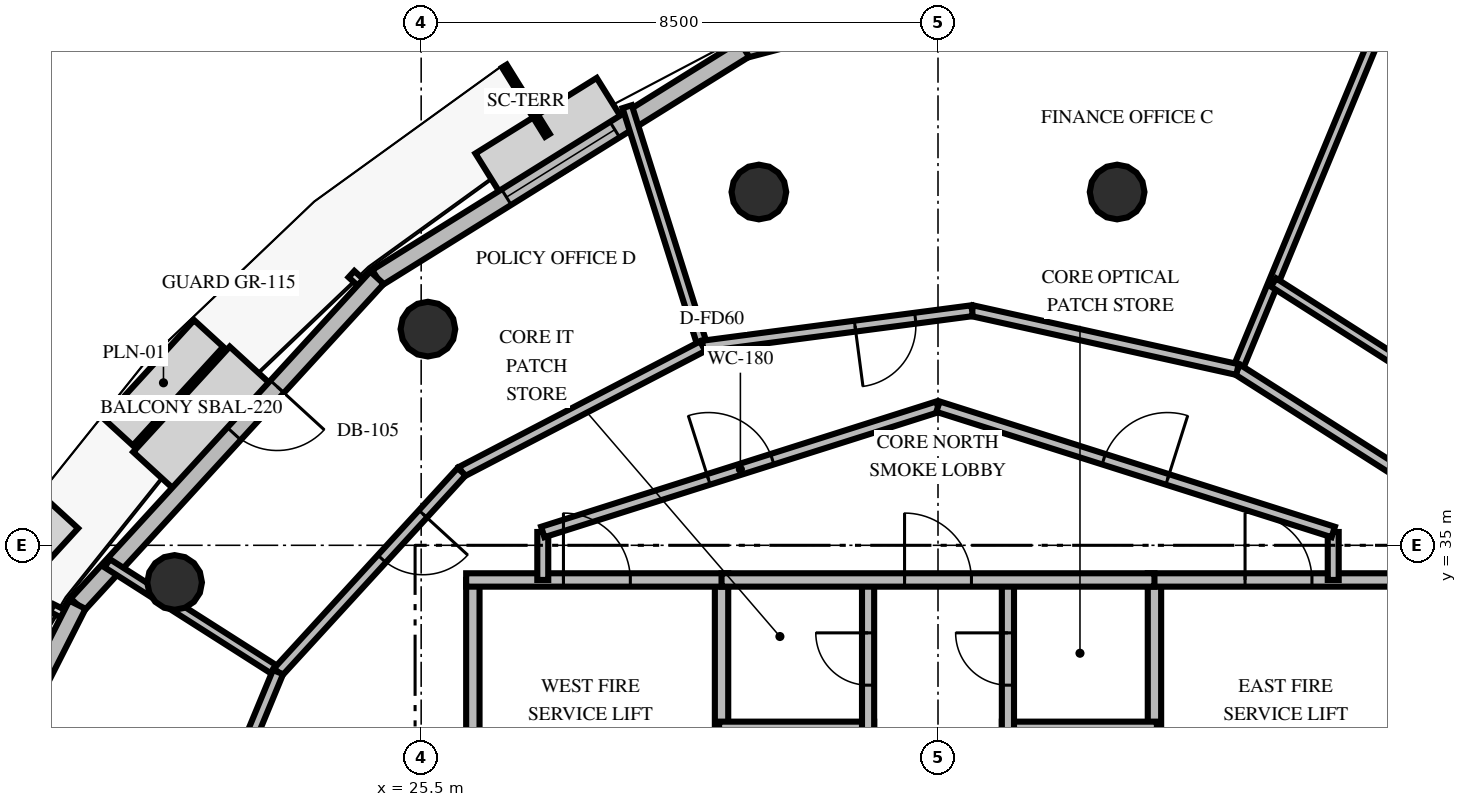
"""IFC4 building model, lengths in metres.
Left out: names, types, materials, properties, quantities, classifications, styles, units other than length and angle.
Written with IfcOpenShell. Run it as: python <this file> out.ifc"""

import sys

from ifc_helpers import new_model, si_unit, direction, frame, frame_2d, origin, origin_2d, place, context, subcontext, project, spatial, rectangle, circle, extrude, element, fill, save


model = new_model("IFC4")
c1 = context("Model", 3, precision=1e-05, world=origin(), true_north=direction((0.0, 1.0)))
c2 = subcontext(c1, "Body", "Model", "MODEL_VIEW")
j1 = project(units=[si_unit("LENGTHUNIT", "METRE"), si_unit("PLANEANGLEUNIT", "RADIAN")], contexts=[c1])
p1 = place(None, origin())
s1 = spatial("IfcSite", under=j1, at=p1, CompositionType="ELEMENT")
p2 = place(p1, origin())
s2 = spatial("IfcBuilding", under=s1, at=p2, CompositionType="ELEMENT")
p3 = place(p2, frame((0.0, 0.0, 230.4)))
s3 = spatial("IfcBuildingStorey", under=s2, at=p3, CompositionType="ELEMENT", Elevation=230.4)
for number, where, z_axis, x_axis in (
    (1, (36.946, 40.81, -0.22), (0.0, 0.0, 1.0), (1.0, 0.0, 0.0)),
    (2, (31.054, 40.81, -0.22), (0.0, 0.0, 1.0), (1.0, 0.0, 0.0)),
    (3, (25.611, 38.555, -0.22), (0.0, 0.0, 1.0), (1.0, 0.0, 0.0)),
    (4, (21.445, 34.389, -0.22), (0.0, 0.0, 1.0), (1.0, 0.0, 0.0)),
):
    element("IfcColumn", number, at=place(p3, frame(where, z_axis=z_axis, x_axis=x_axis)), inside=s3, PredefinedType="COLUMN", context=c2, shape_type="SweptSolid", body=[
        extrude(circle(Radius=0.45, at=origin_2d()), origin(), (0.0, 0.0, 1.0), 3.82),
    ])
p4 = place(p3, frame((37.238, 44.852, 0.0), z_axis=(0.0, 0.0, 1.0), x_axis=(-0.967065492063, -0.254527668555, 0.0)))
e5 = element("IfcWall", 5, at=p4, inside=s3, PredefinedType="SOLIDWALL", context=c2, shape_type="SweptSolid", body=[
    extrude(rectangle(XDim=6.643, YDim=0.3, at=frame_2d((3.322, 0.0))), origin(), (0.0, 0.0, 1.0), 2.76),
])
p5 = place(p4, frame((2.272, 0.0, 0.8)))
e6 = element("IfcOpeningElement", 6, at=p5, cuts=e5, PredefinedType="OPENING", context=c2, shape_type="SweptSolid", body=[
    extrude(rectangle(XDim=2.1, YDim=1.85, at=frame_2d((1.05, 0.925))), frame((0.0, 0.16, 0.0), z_axis=(0.0, -1.0, 0.0), x_axis=(1.0, 0.0, 0.0)), (0.0, 0.0, 1.0), 0.32),
])
p6 = place(p3, frame((30.814, 43.161, 0.0), z_axis=(0.0, 0.0, 1.0), x_axis=(-0.848899232852, -0.528554720406, 0.0)))
e7 = element("IfcWall", 7, at=p6, inside=s3, PredefinedType="SOLIDWALL", context=c2, shape_type="SweptSolid", body=[
    extrude(rectangle(XDim=7.115, YDim=0.3, at=frame_2d((3.558, 0.0))), origin(), (0.0, 0.0, 1.0), 2.76),
])
p7 = place(p6, frame((2.508, 0.0, 0.8)))
e8 = element("IfcOpeningElement", 8, at=p7, cuts=e7, PredefinedType="OPENING", context=c2, shape_type="SweptSolid", body=[
    extrude(rectangle(XDim=2.1, YDim=1.85, at=frame_2d((1.05, 0.925))), frame((0.0, 0.16, 0.0), z_axis=(0.0, -1.0, 0.0), x_axis=(1.0, 0.0, 0.0)), (0.0, 0.0, 1.0), 0.32),
])
p8 = place(p3, frame((24.774, 39.4, 0.0), z_axis=(0.0, 0.0, 1.0), x_axis=(-0.675568478711, -0.737297247094, 0.0)))
e9 = element("IfcWall", 9, at=p8, inside=s3, PredefinedType="SOLIDWALL", context=c2, shape_type="SweptSolid", body=[
    extrude(rectangle(XDim=7.293, YDim=0.3, at=frame_2d((3.646, 0.0))), origin(), (0.0, 0.0, 1.0), 2.76),
])
p9 = place(p8, frame((2.43, 0.0, 0.0)))
e10 = element("IfcOpeningElement", 10, at=p9, cuts=e9, PredefinedType="OPENING", context=c2, shape_type="SweptSolid", body=[
    extrude(rectangle(XDim=1.05, YDim=2.15, at=frame_2d((0.525, 1.075))), frame((0.0, 0.16, 0.0), z_axis=(0.0, -1.0, 0.0), x_axis=(1.0, 0.0, 0.0)), (0.0, 0.0, 1.0), 0.32),
])
p10 = place(p3, frame((19.847, 34.023, 0.0), z_axis=(0.0, 0.0, 1.0), x_axis=(-0.452571902959, -0.891727914025, 0.0)))
e11 = element("IfcWall", 11, at=p10, inside=s3, PredefinedType="SOLIDWALL", context=c2, shape_type="SweptSolid", body=[
    extrude(rectangle(XDim=7.115, YDim=0.3, at=frame_2d((3.558, 0.0))), origin(), (0.0, 0.0, 1.0), 2.76),
])
p11 = place(p10, frame((2.508, 0.0, 0.8)))
e12 = element("IfcOpeningElement", 12, at=p11, cuts=e11, PredefinedType="OPENING", context=c2, shape_type="SweptSolid", body=[
    extrude(rectangle(XDim=2.1, YDim=1.85, at=frame_2d((1.05, 0.925))), frame((0.0, 0.16, 0.0), z_axis=(0.0, -1.0, 0.0), x_axis=(1.0, 0.0, 0.0)), (0.0, 0.0, 1.0), 0.32),
])
p12 = place(p3, frame((26.35, 30.05, 0.0), z_axis=(0.0, 0.0, 1.0), x_axis=(0.0, 1.0, 0.0)))
e13 = element("IfcWall", 13, at=p12, inside=s3, PredefinedType="SOLIDWALL", context=c2, shape_type="SweptSolid", body=[
    extrude(rectangle(XDim=4.38, YDim=0.22, at=frame_2d((2.19, 0.0))), origin(), (0.0, 0.0, 1.0), 2.46),
])
p13 = place(p3, frame((30.44, 30.05, 0.0), z_axis=(0.0, 0.0, 1.0), x_axis=(0.0, 1.0, 0.0)))
e14 = element("IfcWall", 14, at=p13, inside=s3, PredefinedType="SOLIDWALL", context=c2, shape_type="SweptSolid", body=[
    extrude(rectangle(XDim=4.38, YDim=0.22, at=frame_2d((2.19, 0.0))), origin(), (0.0, 0.0, 1.0), 2.46),
])
p14 = place(p13, frame((0.8, 0.0, 0.0)))
e15 = element("IfcOpeningElement", 15, at=p14, cuts=e14, PredefinedType="OPENING", context=c2, shape_type="SweptSolid", body=[
    extrude(rectangle(XDim=1.05, YDim=2.1, at=frame_2d((0.525, 1.05))), frame((0.0, 0.12, 0.0), z_axis=(0.0, -1.0, 0.0), x_axis=(1.0, 0.0, 0.0)), (0.0, 0.0, 1.0), 0.24),
])
p15 = place(p3, frame((26.24, 34.43, 0.0), z_axis=(0.0, 0.0, 1.0), x_axis=(1.0, 0.0, 0.0)))
e16 = element("IfcWall", 16, at=p15, inside=s3, PredefinedType="SOLIDWALL", context=c2, shape_type="SweptSolid", body=[
    extrude(rectangle(XDim=4.31, YDim=0.22, at=frame_2d((2.155, 0.0))), origin(), (0.0, 0.0, 1.0), 2.46),
])
p16 = place(p15, frame((1.6, 0.0, 0.0)))
e17 = element("IfcOpeningElement", 17, at=p16, cuts=e16, PredefinedType="OPENING", context=c2, shape_type="SweptSolid", body=[
    extrude(rectangle(XDim=1.1, YDim=2.15, at=frame_2d((0.55, 1.075))), frame((0.0, 0.12, 0.0), z_axis=(0.0, -1.0, 0.0), x_axis=(1.0, 0.0, 0.0)), (0.0, 0.0, 1.0), 0.24),
])
p17 = place(p3, frame((30.4, 32.0, 0.0), z_axis=(0.0, 0.0, 1.0), x_axis=(1.0, 0.0, 0.0)))
e18 = element("IfcWall", 18, at=p17, inside=s3, PredefinedType="SOLIDWALL", context=c2, shape_type="SweptSolid", body=[
    extrude(rectangle(XDim=2.55, YDim=0.2, at=frame_2d((1.275, 0.0))), origin(), (0.0, 0.0, 1.0), 2.46),
])
p18 = place(p3, frame((32.85, 30.05, 0.0), z_axis=(0.0, 0.0, 1.0), x_axis=(0.0, 1.0, 0.0)))
e19 = element("IfcWall", 19, at=p18, inside=s3, PredefinedType="SOLIDWALL", context=c2, shape_type="SweptSolid", body=[
    extrude(rectangle(XDim=4.38, YDim=0.2, at=frame_2d((2.19, 0.0))), origin(), (0.0, 0.0, 1.0), 2.46),
])
p19 = place(p18, frame((2.65, 0.0, 0.0)))
e20 = element("IfcOpeningElement", 20, at=p19, cuts=e19, PredefinedType="OPENING", context=c2, shape_type="SweptSolid", body=[
    extrude(rectangle(XDim=0.86, YDim=2.05, at=frame_2d((0.43, 1.025))), frame((0.0, 0.11, 0.0), z_axis=(0.0, -1.0, 0.0), x_axis=(1.0, 0.0, 0.0)), (0.0, 0.0, 1.0), 0.22),
])
p20 = place(p3, frame((37.56, 30.05, 0.0), z_axis=(0.0, 0.0, 1.0), x_axis=(0.0, 1.0, 0.0)))
e21 = element("IfcWall", 21, at=p20, inside=s3, PredefinedType="SOLIDWALL", context=c2, shape_type="SweptSolid", body=[
    extrude(rectangle(XDim=4.38, YDim=0.22, at=frame_2d((2.19, 0.0))), origin(), (0.0, 0.0, 1.0), 2.46),
])
p21 = place(p20, frame((0.8, 0.0, 0.0)))
e22 = element("IfcOpeningElement", 22, at=p21, cuts=e21, PredefinedType="OPENING", context=c2, shape_type="SweptSolid", body=[
    extrude(rectangle(XDim=1.05, YDim=2.1, at=frame_2d((0.525, 1.05))), frame((0.0, 0.12, 0.0), z_axis=(0.0, -1.0, 0.0), x_axis=(1.0, 0.0, 0.0)), (0.0, 0.0, 1.0), 0.24),
])
p22 = place(p3, frame((37.45, 34.43, 0.0), z_axis=(0.0, 0.0, 1.0), x_axis=(1.0, 0.0, 0.0)))
e23 = element("IfcWall", 23, at=p22, inside=s3, PredefinedType="SOLIDWALL", context=c2, shape_type="SweptSolid", body=[
    extrude(rectangle(XDim=4.31, YDim=0.22, at=frame_2d((2.155, 0.0))), origin(), (0.0, 0.0, 1.0), 2.46),
])
p23 = place(p22, frame((1.6, 0.0, 0.0)))
e24 = element("IfcOpeningElement", 24, at=p23, cuts=e23, PredefinedType="OPENING", context=c2, shape_type="SweptSolid", body=[
    extrude(rectangle(XDim=1.1, YDim=2.15, at=frame_2d((0.55, 1.075))), frame((0.0, 0.12, 0.0), z_axis=(0.0, -1.0, 0.0), x_axis=(1.0, 0.0, 0.0)), (0.0, 0.0, 1.0), 0.24),
])
p24 = place(p3, frame((35.05, 32.0, 0.0), z_axis=(0.0, 0.0, 1.0), x_axis=(1.0, 0.0, 0.0)))
e25 = element("IfcWall", 25, at=p24, inside=s3, PredefinedType="SOLIDWALL", context=c2, shape_type="SweptSolid", body=[
    extrude(rectangle(XDim=2.55, YDim=0.2, at=frame_2d((1.275, 0.0))), origin(), (0.0, 0.0, 1.0), 2.46),
])
p25 = place(p3, frame((35.15, 30.05, 0.0), z_axis=(0.0, 0.0, 1.0), x_axis=(0.0, 1.0, 0.0)))
e26 = element("IfcWall", 26, at=p25, inside=s3, PredefinedType="SOLIDWALL", context=c2, shape_type="SweptSolid", body=[
    extrude(rectangle(XDim=4.38, YDim=0.2, at=frame_2d((2.19, 0.0))), origin(), (0.0, 0.0, 1.0), 2.46),
])
p26 = place(p25, frame((2.65, 0.0, 0.0)))
e27 = element("IfcOpeningElement", 27, at=p26, cuts=e26, PredefinedType="OPENING", context=c2, shape_type="SweptSolid", body=[
    extrude(rectangle(XDim=0.86, YDim=2.05, at=frame_2d((0.43, 1.025))), frame((0.0, 0.11, 0.0), z_axis=(0.0, -1.0, 0.0), x_axis=(1.0, 0.0, 0.0)), (0.0, 0.0, 1.0), 0.22),
])
p27 = place(p3, frame((30.44, 34.43, 0.0), z_axis=(0.0, 0.0, 1.0), x_axis=(1.0, 0.0, 0.0)))
e28 = element("IfcWall", 28, at=p27, inside=s3, PredefinedType="SOLIDWALL", context=c2, shape_type="SweptSolid", body=[
    extrude(rectangle(XDim=7.12, YDim=0.22, at=frame_2d((3.56, 0.0))), origin(), (0.0, 0.0, 1.0), 2.46),
])
p28 = place(p27, frame((3.01, 0.0, 0.0)))
e29 = element("IfcOpeningElement", 29, at=p28, cuts=e28, PredefinedType="OPENING", context=c2, shape_type="SweptSolid", body=[
    extrude(rectangle(XDim=1.1, YDim=2.15, at=frame_2d((0.55, 1.075))), frame((0.0, 0.12, 0.0), z_axis=(0.0, -1.0, 0.0), x_axis=(1.0, 0.0, 0.0)), (0.0, 0.0, 1.0), 0.24),
])
for number, where, z_axis, x_axis in (
    (30, (27.5, 34.43, 0.0), (0.0, 0.0, 1.0), (0.0, 1.0, 0.0)),
    (31, (40.5, 35.219, 0.0), (0.0, 0.0, 1.0), (0.0, -1.0, 0.0)),
):
    element("IfcWall", number, at=place(p3, frame(where, z_axis=z_axis, x_axis=x_axis)), inside=s3, PredefinedType="PARTITIONING", context=c2, shape_type="SweptSolid", body=[
        extrude(rectangle(XDim=0.789, YDim=0.18, at=frame_2d((0.395, 0.0))), origin(), (0.0, 0.0, 1.0), 2.46),
    ])
p29 = place(p3, frame((27.5, 35.219, 0.0), z_axis=(0.0, 0.0, 1.0), x_axis=(0.953228121756, 0.302251795518, 0.0)))
e32 = element("IfcWall", 32, at=p29, inside=s3, PredefinedType="PARTITIONING", context=c2, shape_type="SweptSolid", body=[
    extrude(rectangle(XDim=6.819, YDim=0.18, at=frame_2d((3.409, 0.0))), origin(), (0.0, 0.0, 1.0), 2.46),
])
p30 = place(p29, frame((2.86, 0.0, 0.0)))
e33 = element("IfcOpeningElement", 33, at=p30, cuts=e32, PredefinedType="OPENING", context=c2, shape_type="SweptSolid", body=[
    extrude(rectangle(XDim=1.1, YDim=2.15, at=frame_2d((0.55, 1.075))), frame((0.0, 0.1, 0.0), z_axis=(0.0, -1.0, 0.0), x_axis=(1.0, 0.0, 0.0)), (0.0, 0.0, 1.0), 0.2),
])
p31 = place(p3, frame((34.0, 37.28, 0.0), z_axis=(0.0, 0.0, 1.0), x_axis=(0.953228121756, -0.302251795518, 0.0)))
e34 = element("IfcWall", 34, at=p31, inside=s3, PredefinedType="PARTITIONING", context=c2, shape_type="SweptSolid", body=[
    extrude(rectangle(XDim=6.819, YDim=0.18, at=frame_2d((3.409, 0.0))), origin(), (0.0, 0.0, 1.0), 2.46),
])
p32 = place(p31, frame((2.86, 0.0, 0.0)))
e35 = element("IfcOpeningElement", 35, at=p32, cuts=e34, PredefinedType="OPENING", context=c2, shape_type="SweptSolid", body=[
    extrude(rectangle(XDim=1.1, YDim=2.15, at=frame_2d((0.55, 1.075))), frame((0.0, 0.1, 0.0), z_axis=(0.0, -1.0, 0.0), x_axis=(1.0, 0.0, 0.0)), (0.0, 0.0, 1.0), 0.2),
])
p33 = place(p3, frame((38.925, 37.89, 0.0), z_axis=(0.0, 0.0, 1.0), x_axis=(0.382676871851, 0.923882249938, 0.0)))
e36 = element("IfcWall", 36, at=p33, inside=s3, PredefinedType="PARTITIONING", context=c2, shape_type="SweptSolid", body=[
    extrude(rectangle(XDim=7.318, YDim=0.16, at=frame_2d((3.659, 0.0))), origin(), (0.0, 0.0, 1.0), 2.46),
])
p34 = place(p3, frame((42.695, 35.489, 0.0), z_axis=(0.0, 0.0, 1.0), x_axis=(-0.843391492769, 0.53729953464, 0.0)))
e37 = element("IfcWall", 37, at=p34, inside=s3, PredefinedType="PARTITIONING", context=c2, shape_type="SweptSolid", body=[
    extrude(rectangle(XDim=4.47, YDim=0.18, at=frame_2d((2.235, 0.0))), origin(), (0.0, 0.0, 1.0), 2.46),
])
p35 = place(p3, frame((43.742, 36.632, 0.0), z_axis=(0.0, 0.0, 1.0), x_axis=(-0.84339841599, 0.537288667204, 0.0)))
e38 = element("IfcWall", 38, at=p35, inside=s3, PredefinedType="PARTITIONING", context=c2, shape_type="SweptSolid", body=[
    extrude(rectangle(XDim=5.008, YDim=0.16, at=frame_2d((2.504, 0.0))), origin(), (0.0, 0.0, 1.0), 2.46),
])
p36 = place(p3, frame((30.13, 38.274, 0.0), z_axis=(0.0, 0.0, 1.0), x_axis=(-0.300684286432, 0.953723733527, 0.0)))
e39 = element("IfcWall", 39, at=p36, inside=s3, PredefinedType="PARTITIONING", context=c2, shape_type="SweptSolid", body=[
    extrude(rectangle(XDim=4.13, YDim=0.16, at=frame_2d((2.065, 0.0))), origin(), (0.0, 0.0, 1.0), 2.46),
])
p37 = place(p3, frame((38.925, 37.89, 0.0), z_axis=(0.0, 0.0, 1.0), x_axis=(-0.976291048481, 0.216461979699, 0.0)))
e40 = element("IfcWall", 40, at=p37, inside=s3, PredefinedType="PARTITIONING", context=c2, shape_type="SweptSolid", body=[
    extrude(rectangle(XDim=4.47, YDim=0.18, at=frame_2d((2.235, 0.0))), origin(), (0.0, 0.0, 1.0), 2.46),
])
p38 = place(p3, frame((34.561, 38.858, 0.0), z_axis=(0.0, 0.0, 1.0), x_axis=(-0.991442206796, -0.130546354154, 0.0)))
e41 = element("IfcWall", 41, at=p38, inside=s3, PredefinedType="PARTITIONING", context=c2, shape_type="SweptSolid", body=[
    extrude(rectangle(XDim=4.47, YDim=0.18, at=frame_2d((2.235, 0.0))), origin(), (0.0, 0.0, 1.0), 2.46),
])
p39 = place(p38, frame((0.942, 0.0, 0.0)))
e42 = element("IfcOpeningElement", 42, at=p39, cuts=e41, PredefinedType="OPENING", context=c2, shape_type="SweptSolid", body=[
    extrude(rectangle(XDim=1.0, YDim=2.15, at=frame_2d((0.5, 1.075))), frame((0.0, 0.1, 0.0), z_axis=(0.0, -1.0, 0.0), x_axis=(1.0, 0.0, 0.0)), (0.0, 0.0, 1.0), 0.2),
])
p40 = place(p3, frame((23.146, 32.915, 0.0), z_axis=(0.0, 0.0, 1.0), x_axis=(-0.843383723395, 0.537311729922, 0.0)))
e43 = element("IfcWall", 43, at=p40, inside=s3, PredefinedType="PARTITIONING", context=c2, shape_type="SweptSolid", body=[
    extrude(rectangle(XDim=3.331, YDim=0.16, at=frame_2d((1.666, 0.0))), origin(), (0.0, 0.0, 1.0), 2.46),
])
p41 = place(p3, frame((30.13, 38.274, 0.0), z_axis=(0.0, 0.0, 1.0), x_axis=(-0.886999386077, -0.461770602247, 0.0)))
e44 = element("IfcWall", 44, at=p41, inside=s3, PredefinedType="PARTITIONING", context=c2, shape_type="SweptSolid", body=[
    extrude(rectangle(XDim=4.47, YDim=0.18, at=frame_2d((2.235, 0.0))), origin(), (0.0, 0.0, 1.0), 2.46),
])
p42 = place(p3, frame((26.165, 36.21, 0.0), z_axis=(0.0, 0.0, 1.0), x_axis=(-0.675600949954, -0.737267493126, 0.0)))
e45 = element("IfcWall", 45, at=p42, inside=s3, PredefinedType="PARTITIONING", context=c2, shape_type="SweptSolid", body=[
    extrude(rectangle(XDim=4.47, YDim=0.18, at=frame_2d((2.235, 0.0))), origin(), (0.0, 0.0, 1.0), 2.46),
])
p43 = place(p42, frame((0.942, 0.0, 0.0)))
e46 = element("IfcOpeningElement", 46, at=p43, cuts=e45, PredefinedType="OPENING", context=c2, shape_type="SweptSolid", body=[
    extrude(rectangle(XDim=1.0, YDim=2.15, at=frame_2d((0.5, 1.075))), frame((0.0, 0.1, 0.0), z_axis=(0.0, -1.0, 0.0), x_axis=(1.0, 0.0, 0.0)), (0.0, 0.0, 1.0), 0.2),
])
p44 = place(p3, frame((23.146, 32.915, 0.0), z_axis=(0.0, 0.0, 1.0), x_axis=(-0.382683050338, -0.923879690752, 0.0)))
e47 = element("IfcWall", 47, at=p44, inside=s3, PredefinedType="PARTITIONING", context=c2, shape_type="SweptSolid", body=[
    extrude(rectangle(XDim=4.47, YDim=0.18, at=frame_2d((2.235, 0.0))), origin(), (0.0, 0.0, 1.0), 2.46),
])
p45 = place(p44, frame((1.735, 0.0, 0.0)))
e48 = element("IfcOpeningElement", 48, at=p45, cuts=e47, PredefinedType="OPENING", context=c2, shape_type="SweptSolid", body=[
    extrude(rectangle(XDim=1.0, YDim=2.15, at=frame_2d((0.5, 1.075))), frame((0.0, 0.1, 0.0), z_axis=(0.0, -1.0, 0.0), x_axis=(1.0, 0.0, 0.0)), (0.0, 0.0, 1.0), 0.2),
])
p46 = place(p7, origin())
e49 = element("IfcWindow", 49, at=p46, inside=s3, PartitioningType="SINGLE_PANEL", PredefinedType="WINDOW", context=c2, shape_type="SweptSolid", body=[
    extrude(rectangle(XDim=2.1, YDim=1.85, at=frame_2d((1.05, 0.925))), frame((0.0, 0.03, 0.0), z_axis=(0.0, -1.0, 0.0), x_axis=(1.0, 0.0, 0.0)), (0.0, 0.0, 1.0), 0.06),
])
fill(e8, e49)
p47 = place(p9, origin())
e50 = element("IfcDoor", 50, at=p47, inside=s3, OperationType="SINGLE_SWING_LEFT", PredefinedType="DOOR", context=c2, shape_type="SweptSolid", body=[
    extrude(rectangle(XDim=1.05, YDim=2.15, at=frame_2d((0.525, 1.075))), frame((0.0, 0.025, 0.0), z_axis=(0.0, -1.0, 0.0), x_axis=(1.0, 0.0, 0.0)), (0.0, 0.0, 1.0), 0.05),
])
fill(e10, e50)
p48 = place(p16, origin())
e51 = element("IfcDoor", 51, at=p48, inside=s3, OperationType="SINGLE_SWING_LEFT", PredefinedType="DOOR", context=c2, shape_type="SweptSolid", body=[
    extrude(rectangle(XDim=1.1, YDim=2.15, at=frame_2d((0.55, 1.075))), frame((0.0, 0.025, 0.0), z_axis=(0.0, -1.0, 0.0), x_axis=(1.0, 0.0, 0.0)), (0.0, 0.0, 1.0), 0.05),
])
fill(e17, e51)
p49 = place(p19, origin())
e52 = element("IfcDoor", 52, at=p49, inside=s3, OperationType="SINGLE_SWING_RIGHT", PredefinedType="TRAPDOOR", context=c2, shape_type="SweptSolid", body=[
    extrude(rectangle(XDim=0.86, YDim=2.05, at=frame_2d((0.43, 1.025))), frame((0.0, 0.025, 0.0), z_axis=(0.0, -1.0, 0.0), x_axis=(1.0, 0.0, 0.0)), (0.0, 0.0, 1.0), 0.05),
])
fill(e20, e52)
p50 = place(p23, origin())
e53 = element("IfcDoor", 53, at=p50, inside=s3, OperationType="SINGLE_SWING_LEFT", PredefinedType="DOOR", context=c2, shape_type="SweptSolid", body=[
    extrude(rectangle(XDim=1.1, YDim=2.15, at=frame_2d((0.55, 1.075))), frame((0.0, 0.025, 0.0), z_axis=(0.0, -1.0, 0.0), x_axis=(1.0, 0.0, 0.0)), (0.0, 0.0, 1.0), 0.05),
])
fill(e24, e53)
p51 = place(p26, origin())
e54 = element("IfcDoor", 54, at=p51, inside=s3, OperationType="SINGLE_SWING_RIGHT", PredefinedType="TRAPDOOR", context=c2, shape_type="SweptSolid", body=[
    extrude(rectangle(XDim=0.86, YDim=2.05, at=frame_2d((0.43, 1.025))), frame((0.0, 0.025, 0.0), z_axis=(0.0, -1.0, 0.0), x_axis=(1.0, 0.0, 0.0)), (0.0, 0.0, 1.0), 0.05),
])
fill(e27, e54)
p52 = place(p28, origin())
e55 = element("IfcDoor", 55, at=p52, inside=s3, OperationType="SINGLE_SWING_LEFT", PredefinedType="DOOR", context=c2, shape_type="SweptSolid", body=[
    extrude(rectangle(XDim=1.1, YDim=2.15, at=frame_2d((0.55, 1.075))), frame((0.0, 0.025, 0.0), z_axis=(0.0, -1.0, 0.0), x_axis=(1.0, 0.0, 0.0)), (0.0, 0.0, 1.0), 0.05),
])
fill(e29, e55)
p53 = place(p30, origin())
e56 = element("IfcDoor", 56, at=p53, inside=s3, OperationType="SINGLE_SWING_LEFT", PredefinedType="DOOR", context=c2, shape_type="SweptSolid", body=[
    extrude(rectangle(XDim=1.1, YDim=2.15, at=frame_2d((0.55, 1.075))), frame((0.0, 0.025, 0.0), z_axis=(0.0, -1.0, 0.0), x_axis=(1.0, 0.0, 0.0)), (0.0, 0.0, 1.0), 0.05),
])
fill(e33, e56)
p54 = place(p32, origin())
e57 = element("IfcDoor", 57, at=p54, inside=s3, OperationType="SINGLE_SWING_RIGHT", PredefinedType="DOOR", context=c2, shape_type="SweptSolid", body=[
    extrude(rectangle(XDim=1.1, YDim=2.15, at=frame_2d((0.55, 1.075))), frame((0.0, 0.025, 0.0), z_axis=(0.0, -1.0, 0.0), x_axis=(1.0, 0.0, 0.0)), (0.0, 0.0, 1.0), 0.05),
])
fill(e35, e57)
p55 = place(p39, origin())
e58 = element("IfcDoor", 58, at=p55, inside=s3, OperationType="SINGLE_SWING_RIGHT", PredefinedType="DOOR", context=c2, shape_type="SweptSolid", body=[
    extrude(rectangle(XDim=1.0, YDim=2.15, at=frame_2d((0.5, 1.075))), frame((0.0, 0.025, 0.0), z_axis=(0.0, -1.0, 0.0), x_axis=(1.0, 0.0, 0.0)), (0.0, 0.0, 1.0), 0.05),
])
fill(e42, e58)
p56 = place(p43, origin())
e59 = element("IfcDoor", 59, at=p56, inside=s3, OperationType="SINGLE_SWING_LEFT", PredefinedType="DOOR", context=c2, shape_type="SweptSolid", body=[
    extrude(rectangle(XDim=1.0, YDim=2.15, at=frame_2d((0.5, 1.075))), frame((0.0, 0.025, 0.0), z_axis=(0.0, -1.0, 0.0), x_axis=(1.0, 0.0, 0.0)), (0.0, 0.0, 1.0), 0.05),
])
fill(e46, e59)
save(model, sys.argv[1])
